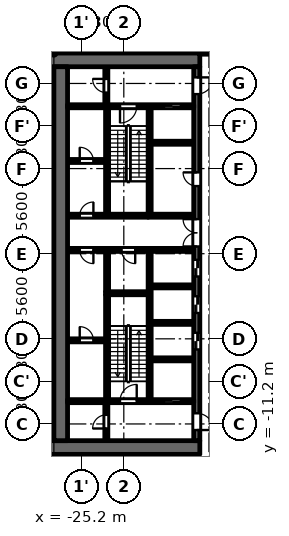
"""IFC4 building model, lengths in metres.
Left out: names, types, materials, properties, quantities, classifications, styles, units other than length and angle.
Written with IfcOpenShell. Run it as: python <this file> out.ifc"""

import sys

from ifc_helpers import new_model, si_unit, direction, frame, frame_2d, origin, place, context, subcontext, project, spatial, rectangle, extrude, element, fill, save


model = new_model("IFC4")
c1 = context("Model", 3, precision=1e-05, world=origin(), true_north=direction((0.0, 1.0)))
c2 = subcontext(c1, "Body", "Model", "MODEL_VIEW")
j1 = project(units=[si_unit("LENGTHUNIT", "METRE"), si_unit("PLANEANGLEUNIT", "RADIAN")], contexts=[c1])
p1 = place(None, origin())
s1 = spatial("IfcSite", under=j1, at=p1, CompositionType="ELEMENT")
p2 = place(p1, origin())
s2 = spatial("IfcBuilding", under=s1, at=p2, CompositionType="ELEMENT")
p3 = place(p2, frame((0.0, 0.0, 6.5)))
s3 = spatial("IfcBuildingStorey", under=s2, at=p3, CompositionType="ELEMENT", Elevation=6.5)
p4 = place(p3, frame((-23.5, -2.5, 0.0), z_axis=(0.0, 0.0, 1.0), x_axis=(0.0, 1.0, 0.0)))
e1 = element("IfcWall", 1, at=p4, inside=s3, PredefinedType="PARTITIONING", context=c2, shape_type="SweptSolid", body=[
    extrude(rectangle(XDim=2.65, YDim=0.2, at=frame_2d((1.325, 0.0))), origin(), (0.0, 0.0, 1.0), 4.45),
])
p5 = place(p3, frame((-20.7, 2.6, 0.0), z_axis=(0.0, 0.0, 1.0), x_axis=(0.0, 1.0, 0.0)))
e2 = element("IfcWall", 2, at=p5, inside=s3, PredefinedType="SHEAR", context=c2, shape_type="SweptSolid", body=[
    extrude(rectangle(XDim=7.0, YDim=0.2, at=frame_2d((3.5, 0.0))), origin(), (0.0, 0.0, 1.0), 4.45),
])
p6 = place(p3, frame((-20.7, -9.6, 0.0), z_axis=(0.0, 0.0, 1.0), x_axis=(0.0, 1.0, 0.0)))
e3 = element("IfcWall", 3, at=p6, inside=s3, PredefinedType="SHEAR", context=c2, shape_type="SweptSolid", body=[
    extrude(rectangle(XDim=9.75, YDim=0.2, at=frame_2d((4.875, 0.0))), origin(), (0.0, 0.0, 1.0), 4.45),
])
p7 = place(p3, frame((-20.8, 2.5, 0.0), z_axis=(0.0, 0.0, 1.0), x_axis=(-1.0, 0.0, 0.0)))
e4 = element("IfcWall", 4, at=p7, inside=s3, PredefinedType="SHEAR", context=c2, shape_type="SweptSolid", body=[
    extrude(rectangle(XDim=5.3, YDim=0.2, at=frame_2d((2.65, 0.0))), origin(), (0.0, 0.0, 1.0), 4.45),
])
p8 = place(p7, frame((3.6, 0.0, 0.0)))
e5 = element("IfcOpeningElement", 5, at=p8, cuts=e4, PredefinedType="OPENING", context=c2, shape_type="SweptSolid", body=[
    extrude(rectangle(XDim=0.9, YDim=2.1, at=frame_2d((0.45, 1.05))), frame((0.0, 0.11, 0.0), z_axis=(0.0, -1.0, 0.0), x_axis=(1.0, 0.0, 0.0)), (0.0, 0.0, 1.0), 0.22),
])
p9 = place(p3, frame((-20.8, 0.25, 0.0), z_axis=(0.0, 0.0, 1.0), x_axis=(-1.0, 0.0, 0.0)))
e6 = element("IfcWall", 6, at=p9, inside=s3, PredefinedType="PARTITIONING", context=c2, shape_type="SweptSolid", body=[
    extrude(rectangle(XDim=5.3, YDim=0.2, at=frame_2d((2.65, 0.0))), origin(), (0.0, 0.0, 1.0), 4.45),
])
p10 = place(p9, frame((0.85, 0.0, 0.0)))
e7 = element("IfcOpeningElement", 7, at=p10, cuts=e6, PredefinedType="OPENING", context=c2, shape_type="SweptSolid", body=[
    extrude(rectangle(XDim=0.9, YDim=2.1, at=frame_2d((0.45, 1.05))), frame((0.0, 0.11, 0.0), z_axis=(0.0, -1.0, 0.0), x_axis=(1.0, 0.0, 0.0)), (0.0, 0.0, 1.0), 0.22),
])
p11 = place(p9, frame((3.6, 0.0, 0.0)))
e8 = element("IfcOpeningElement", 8, at=p11, cuts=e6, PredefinedType="OPENING", context=c2, shape_type="SweptSolid", body=[
    extrude(rectangle(XDim=0.9, YDim=2.1, at=frame_2d((0.45, 1.05))), frame((0.0, 0.11, 0.0), z_axis=(0.0, -1.0, 0.0), x_axis=(1.0, 0.0, 0.0)), (0.0, 0.0, 1.0), 0.22),
])
for number, where, z_axis, x_axis in (
    (9, (-17.4, 12.75, 0.0), (0.0, 0.0, 1.0), (-1.0, 0.0, 0.0)),
    (10, (-17.4, -12.75, 0.0), (0.0, 0.0, 1.0), (-1.0, 0.0, 0.0)),
):
    element("IfcWall", number, at=place(p3, frame(where, z_axis=z_axis, x_axis=x_axis)), inside=s3, PredefinedType="SHEAR", context=c2, shape_type="SweptSolid", body=[
        extrude(rectangle(XDim=10.4, YDim=0.9, at=frame_2d((5.2, 0.0))), origin(), (0.0, 0.0, 1.0), 4.45),
    ])
p12 = place(p3, frame((-17.6, -12.3, 0.0), z_axis=(0.0, 0.0, 1.0), x_axis=(0.0, 1.0, 0.0)))
e11 = element("IfcWall", 11, at=p12, inside=s3, PredefinedType="SHEAR", context=c2, shape_type="SweptSolid", body=[
    extrude(rectangle(XDim=24.6, YDim=0.4, at=frame_2d((12.3, 0.0))), origin(), (0.0, 0.0, 1.0), 4.45),
])
p13 = place(p12, frame((6.0, 0.0, 0.0)))
e12 = element("IfcOpeningElement", 12, at=p13, cuts=e11, PredefinedType="OPENING", context=c2, shape_type="SweptSolid", body=[
    extrude(rectangle(XDim=1.1, YDim=2.1, at=frame_2d((0.55, 1.05))), frame((0.0, 0.21, 0.0), z_axis=(0.0, -1.0, 0.0), x_axis=(1.0, 0.0, 0.0)), (0.0, 0.0, 1.0), 0.42),
])
p14 = place(p12, frame((8.4, 0.0, 0.0)))
e13 = element("IfcOpeningElement", 13, at=p14, cuts=e11, PredefinedType="OPENING", context=c2, shape_type="SweptSolid", body=[
    extrude(rectangle(XDim=1.1, YDim=2.1, at=frame_2d((0.55, 1.05))), frame((0.0, 0.21, 0.0), z_axis=(0.0, -1.0, 0.0), x_axis=(1.0, 0.0, 0.0)), (0.0, 0.0, 1.0), 0.42),
])
p15 = place(p12, frame((10.8, 0.0, 0.0)))
e14 = element("IfcOpeningElement", 14, at=p15, cuts=e11, PredefinedType="OPENING", context=c2, shape_type="SweptSolid", body=[
    extrude(rectangle(XDim=1.1, YDim=2.1, at=frame_2d((0.55, 1.05))), frame((0.0, 0.21, 0.0), z_axis=(0.0, -1.0, 0.0), x_axis=(1.0, 0.0, 0.0)), (0.0, 0.0, 1.0), 0.42),
])
p16 = place(p12, frame((16.75, 0.0, 0.0)))
e15 = element("IfcOpeningElement", 15, at=p16, cuts=e11, PredefinedType="OPENING", context=c2, shape_type="SweptSolid", body=[
    extrude(rectangle(XDim=0.9, YDim=2.1, at=frame_2d((0.45, 1.05))), frame((0.0, 0.21, 0.0), z_axis=(0.0, -1.0, 0.0), x_axis=(1.0, 0.0, 0.0)), (0.0, 0.0, 1.0), 0.42),
])
p17 = place(p12, frame((22.8, 0.0, 0.0)))
e16 = element("IfcOpeningElement", 16, at=p17, cuts=e11, PredefinedType="OPENING", context=c2, shape_type="SweptSolid", body=[
    extrude(rectangle(XDim=1.1, YDim=2.1, at=frame_2d((0.55, 1.05))), frame((0.0, 0.21, 0.0), z_axis=(0.0, -1.0, 0.0), x_axis=(1.0, 0.0, 0.0)), (0.0, 0.0, 1.0), 0.42),
])
p18 = place(p12, frame((0.7, 0.0, 0.0)))
e17 = element("IfcOpeningElement", 17, at=p18, cuts=e11, PredefinedType="OPENING", context=c2, shape_type="SweptSolid", body=[
    extrude(rectangle(XDim=1.1, YDim=2.1, at=frame_2d((0.55, 1.05))), frame((0.0, 0.21, 0.0), z_axis=(0.0, -1.0, 0.0), x_axis=(1.0, 0.0, 0.0)), (0.0, 0.0, 1.0), 0.42),
])
p19 = place(p12, frame((12.775, 0.0, 0.0)))
e18 = element("IfcOpeningElement", 18, at=p19, cuts=e11, PredefinedType="OPENING", context=c2, shape_type="SweptSolid", body=[
    extrude(rectangle(XDim=1.8, YDim=2.1, at=frame_2d((0.9, 1.05))), frame((0.0, 0.21, 0.0), z_axis=(0.0, -1.0, 0.0), x_axis=(1.0, 0.0, 0.0)), (0.0, 0.0, 1.0), 0.42),
])
p20 = place(p3, frame((-26.55, -12.3, 0.0), z_axis=(0.0, 0.0, 1.0), x_axis=(0.0, 1.0, 0.0)))
e19 = element("IfcWall", 19, at=p20, inside=s3, PredefinedType="SHEAR", context=c2, shape_type="SweptSolid", body=[
    extrude(rectangle(XDim=24.6, YDim=0.9, at=frame_2d((12.3, 0.0))), origin(), (0.0, 0.0, 1.0), 4.45),
])
p21 = place(p3, frame((-23.55, 9.8, 0.0), z_axis=(0.0, 0.0, 1.0), x_axis=(0.0, 1.0, 0.0)))
e20 = element("IfcWall", 20, at=p21, inside=s3, PredefinedType="PARTITIONING", context=c2, shape_type="SweptSolid", body=[
    extrude(rectangle(XDim=2.5, YDim=0.2, at=frame_2d((1.25, 0.0))), origin(), (0.0, 0.0, 1.0), 4.45),
])
p22 = place(p21, frame((0.8, 0.0, 0.0)))
e21 = element("IfcOpeningElement", 21, at=p22, cuts=e20, PredefinedType="OPENING", context=c2, shape_type="SweptSolid", body=[
    extrude(rectangle(XDim=0.9, YDim=2.1, at=frame_2d((0.45, 1.05))), frame((0.0, 0.11, 0.0), z_axis=(0.0, -1.0, 0.0), x_axis=(1.0, 0.0, 0.0)), (0.0, 0.0, 1.0), 0.22),
])
p23 = place(p3, frame((-23.55, -12.3, 0.0), z_axis=(0.0, 0.0, 1.0), x_axis=(0.0, 1.0, 0.0)))
e22 = element("IfcWall", 22, at=p23, inside=s3, PredefinedType="PARTITIONING", context=c2, shape_type="SweptSolid", body=[
    extrude(rectangle(XDim=2.5, YDim=0.2, at=frame_2d((1.25, 0.0))), origin(), (0.0, 0.0, 1.0), 4.45),
])
p24 = place(p23, frame((0.8, 0.0, 0.0)))
e23 = element("IfcOpeningElement", 23, at=p24, cuts=e22, PredefinedType="OPENING", context=c2, shape_type="SweptSolid", body=[
    extrude(rectangle(XDim=0.9, YDim=2.1, at=frame_2d((0.45, 1.05))), frame((0.0, 0.11, 0.0), z_axis=(0.0, -1.0, 0.0), x_axis=(1.0, 0.0, 0.0)), (0.0, 0.0, 1.0), 0.22),
])
p25 = place(p3, frame((-23.6, -5.7, 0.0), z_axis=(0.0, 0.0, 1.0), x_axis=(-1.0, 0.0, 0.0)))
e24 = element("IfcWall", 24, at=p25, inside=s3, PredefinedType="PARTITIONING", context=c2, shape_type="SweptSolid", body=[
    extrude(rectangle(XDim=2.5, YDim=0.2, at=frame_2d((1.25, 0.0))), origin(), (0.0, 0.0, 1.0), 4.45),
])
p26 = place(p25, frame((0.8, 0.0, 0.0)))
e25 = element("IfcOpeningElement", 25, at=p26, cuts=e24, PredefinedType="OPENING", context=c2, shape_type="SweptSolid", body=[
    extrude(rectangle(XDim=0.9, YDim=2.1, at=frame_2d((0.45, 1.05))), frame((0.0, 0.11, 0.0), z_axis=(0.0, -1.0, 0.0), x_axis=(1.0, 0.0, 0.0)), (0.0, 0.0, 1.0), 0.22),
])
p27 = place(p3, frame((-23.6, 6.1, 0.0), z_axis=(0.0, 0.0, 1.0), x_axis=(-1.0, 0.0, 0.0)))
e26 = element("IfcWall", 26, at=p27, inside=s3, PredefinedType="PARTITIONING", context=c2, shape_type="SweptSolid", body=[
    extrude(rectangle(XDim=2.5, YDim=0.2, at=frame_2d((1.25, 0.0))), origin(), (0.0, 0.0, 1.0), 4.45),
])
p28 = place(p27, frame((0.8, 0.0, 0.0)))
e27 = element("IfcOpeningElement", 27, at=p28, cuts=e26, PredefinedType="OPENING", context=c2, shape_type="SweptSolid", body=[
    extrude(rectangle(XDim=0.9, YDim=2.1, at=frame_2d((0.45, 1.05))), frame((0.0, 0.11, 0.0), z_axis=(0.0, -1.0, 0.0), x_axis=(1.0, 0.0, 0.0)), (0.0, 0.0, 1.0), 0.22),
])
p29 = place(p3, frame((-17.8, -9.7, 0.0), z_axis=(0.0, 0.0, 1.0), x_axis=(-1.0, 0.0, 0.0)))
e28 = element("IfcWall", 28, at=p29, inside=s3, PredefinedType="SHEAR", context=c2, shape_type="SweptSolid", body=[
    extrude(rectangle(XDim=8.3, YDim=0.2, at=frame_2d((4.15, 0.0))), origin(), (0.0, 0.0, 1.0), 4.45),
])
p30 = place(p29, frame((0.85, 0.0, 0.0)))
e29 = element("IfcOpeningElement", 29, at=p30, cuts=e28, PredefinedType="OPENING", context=c2, shape_type="SweptSolid", body=[
    extrude(rectangle(XDim=1.1, YDim=2.1, at=frame_2d((0.55, 1.05))), frame((0.0, 0.11, 0.0), z_axis=(0.0, -1.0, 0.0), x_axis=(1.0, 0.0, 0.0)), (0.0, 0.0, 1.0), 0.22),
])
p31 = place(p29, frame((3.75, 0.0, 0.0)))
e30 = element("IfcOpeningElement", 30, at=p31, cuts=e28, PredefinedType="OPENING", context=c2, shape_type="SweptSolid", body=[
    extrude(rectangle(XDim=1.1, YDim=2.1, at=frame_2d((0.55, 1.05))), frame((0.0, 0.11, 0.0), z_axis=(0.0, -1.0, 0.0), x_axis=(1.0, 0.0, 0.0)), (0.0, 0.0, 1.0), 0.22),
])
for number, where, z_axis, x_axis in (
    (31, (-17.8, -6.95, 0.0), (0.0, 0.0, 1.0), (-1.0, 0.0, 0.0)),
    (32, (-17.8, -4.55, 0.0), (0.0, 0.0, 1.0), (-1.0, 0.0, 0.0)),
    (33, (-17.8, -2.15, 0.0), (0.0, 0.0, 1.0), (-1.0, 0.0, 0.0)),
):
    element("IfcWall", number, at=place(p3, frame(where, z_axis=z_axis, x_axis=x_axis)), inside=s3, PredefinedType="PARTITIONING", context=c2, shape_type="SweptSolid", body=[
        extrude(rectangle(XDim=2.8, YDim=0.2, at=frame_2d((1.4, 0.0))), origin(), (0.0, 0.0, 1.0), 4.45),
    ])
for number, where, z_axis, x_axis in (
    (34, (-17.8, 0.25, 0.0), (0.0, 0.0, 1.0), (-1.0, 0.0, 0.0)),
    (35, (-17.8, 2.5, 0.0), (0.0, 0.0, 1.0), (-1.0, 0.0, 0.0)),
):
    element("IfcWall", number, at=place(p3, frame(where, z_axis=z_axis, x_axis=x_axis)), inside=s3, PredefinedType="PARTITIONING", context=c2, shape_type="SweptSolid", body=[
        extrude(rectangle(XDim=3.0, YDim=0.2, at=frame_2d((1.5, 0.0))), origin(), (0.0, 0.0, 1.0), 4.45),
    ])
p32 = place(p3, frame((-17.8, 7.3, 0.0), z_axis=(0.0, 0.0, 1.0), x_axis=(-1.0, 0.0, 0.0)))
e36 = element("IfcWall", 36, at=p32, inside=s3, PredefinedType="PARTITIONING", context=c2, shape_type="SweptSolid", body=[
    extrude(rectangle(XDim=2.8, YDim=0.2, at=frame_2d((1.4, 0.0))), origin(), (0.0, 0.0, 1.0), 4.45),
])
p33 = place(p3, frame((-17.8, 9.7, 0.0), z_axis=(0.0, 0.0, 1.0), x_axis=(-1.0, 0.0, 0.0)))
e37 = element("IfcWall", 37, at=p33, inside=s3, PredefinedType="SHEAR", context=c2, shape_type="SweptSolid", body=[
    extrude(rectangle(XDim=8.3, YDim=0.2, at=frame_2d((4.15, 0.0))), origin(), (0.0, 0.0, 1.0), 4.45),
])
p34 = place(p33, frame((0.85, 0.0, 0.0)))
e38 = element("IfcOpeningElement", 38, at=p34, cuts=e37, PredefinedType="OPENING", context=c2, shape_type="SweptSolid", body=[
    extrude(rectangle(XDim=1.1, YDim=2.1, at=frame_2d((0.55, 1.05))), frame((0.0, 0.11, 0.0), z_axis=(0.0, -1.0, 0.0), x_axis=(1.0, 0.0, 0.0)), (0.0, 0.0, 1.0), 0.22),
])
p35 = place(p33, frame((3.75, 0.0, 0.0)))
e39 = element("IfcOpeningElement", 39, at=p35, cuts=e37, PredefinedType="OPENING", context=c2, shape_type="SweptSolid", body=[
    extrude(rectangle(XDim=1.1, YDim=2.1, at=frame_2d((0.55, 1.05))), frame((0.0, 0.11, 0.0), z_axis=(0.0, -1.0, 0.0), x_axis=(1.0, 0.0, 0.0)), (0.0, 0.0, 1.0), 0.22),
])
p36 = place(p3, frame((-23.5, 2.6, 0.0), z_axis=(0.0, 0.0, 1.0), x_axis=(0.0, 1.0, 0.0)))
e40 = element("IfcWall", 40, at=p36, inside=s3, PredefinedType="SHEAR", context=c2, shape_type="SweptSolid", body=[
    extrude(rectangle(XDim=7.0, YDim=0.2, at=frame_2d((3.5, 0.0))), origin(), (0.0, 0.0, 1.0), 4.45),
])
p37 = place(p3, frame((-23.5, -9.6, 0.0), z_axis=(0.0, 0.0, 1.0), x_axis=(0.0, 1.0, 0.0)))
e41 = element("IfcWall", 41, at=p37, inside=s3, PredefinedType="SHEAR", context=c2, shape_type="SweptSolid", body=[
    extrude(rectangle(XDim=6.9, YDim=0.2, at=frame_2d((3.45, 0.0))), origin(), (0.0, 0.0, 1.0), 4.45),
])
p38 = place(p3, frame((-20.8, -2.6, 0.0), z_axis=(0.0, 0.0, 1.0), x_axis=(-1.0, 0.0, 0.0)))
e42 = element("IfcWall", 42, at=p38, inside=s3, PredefinedType="SHEAR", context=c2, shape_type="SweptSolid", body=[
    extrude(rectangle(XDim=2.8, YDim=0.2, at=frame_2d((1.4, 0.0))), origin(), (0.0, 0.0, 1.0), 4.45),
])
p39 = place(p3, frame((-17.4, 13.2, 0.0), z_axis=(0.0, 0.0, 1.0), x_axis=(1.0, 0.0, 0.0)))
e43 = element("IfcWall", 43, at=p39, inside=s3, PredefinedType="PARTITIONING", context=c2, shape_type="SweptSolid", body=[
    extrude(rectangle(XDim=34.8, YDim=0.15, at=frame_2d((17.4, 0.0))), origin(), (0.0, 0.0, 1.0), 4.45),
])
p40 = place(p39, frame((3.05, 0.0, 0.0)))
e44 = element("IfcOpeningElement", 44, at=p40, cuts=e43, PredefinedType="OPENING", context=c2, shape_type="SweptSolid", body=[
    extrude(rectangle(XDim=1.8, YDim=2.1, at=frame_2d((0.9, 1.05))), frame((0.0, 0.085, 0.0), z_axis=(0.0, -1.0, 0.0), x_axis=(1.0, 0.0, 0.0)), (0.0, 0.0, 1.0), 0.17),
])
p41 = place(p39, frame((0.75, 0.0, 0.0)))
e45 = element("IfcOpeningElement", 45, at=p41, cuts=e43, PredefinedType="OPENING", context=c2, shape_type="SweptSolid", body=[
    extrude(rectangle(XDim=1.0, YDim=2.1, at=frame_2d((0.5, 1.05))), frame((0.0, 0.085, 0.0), z_axis=(0.0, -1.0, 0.0), x_axis=(1.0, 0.0, 0.0)), (0.0, 0.0, 1.0), 0.17),
])
p42 = place(p39, frame((33.15, 0.0, 0.0)))
e46 = element("IfcOpeningElement", 46, at=p42, cuts=e43, PredefinedType="OPENING", context=c2, shape_type="SweptSolid", body=[
    extrude(rectangle(XDim=1.0, YDim=2.1, at=frame_2d((0.5, 1.05))), frame((0.0, 0.085, 0.0), z_axis=(0.0, -1.0, 0.0), x_axis=(1.0, 0.0, 0.0)), (0.0, 0.0, 1.0), 0.17),
])
p43 = place(p30, origin())
e47 = element("IfcDoor", 47, at=p43, inside=s3, OperationType="DOUBLE_DOOR_SLIDING", PredefinedType="DOOR", context=c2, shape_type="SweptSolid", body=[
    extrude(rectangle(XDim=1.1, YDim=2.1, at=frame_2d((0.55, 1.05))), frame((0.0, 0.025, 0.0), z_axis=(0.0, -1.0, 0.0), x_axis=(1.0, 0.0, 0.0)), (0.0, 0.0, 1.0), 0.05),
])
fill(e29, e47)
p44 = place(p13, origin())
e48 = element("IfcDoor", 48, at=p44, inside=s3, OperationType="DOUBLE_DOOR_SLIDING", PredefinedType="DOOR", context=c2, shape_type="SweptSolid", body=[
    extrude(rectangle(XDim=1.1, YDim=2.1, at=frame_2d((0.55, 1.05))), frame((0.0, 0.025, 0.0), z_axis=(0.0, -1.0, 0.0), x_axis=(1.0, 0.0, 0.0)), (0.0, 0.0, 1.0), 0.05),
])
fill(e12, e48)
p45 = place(p14, origin())
e49 = element("IfcDoor", 49, at=p45, inside=s3, OperationType="DOUBLE_DOOR_SLIDING", PredefinedType="DOOR", context=c2, shape_type="SweptSolid", body=[
    extrude(rectangle(XDim=1.1, YDim=2.1, at=frame_2d((0.55, 1.05))), frame((0.0, 0.025, 0.0), z_axis=(0.0, -1.0, 0.0), x_axis=(1.0, 0.0, 0.0)), (0.0, 0.0, 1.0), 0.05),
])
fill(e13, e49)
p46 = place(p15, origin())
e50 = element("IfcDoor", 50, at=p46, inside=s3, OperationType="DOUBLE_DOOR_SLIDING", PredefinedType="DOOR", context=c2, shape_type="SweptSolid", body=[
    extrude(rectangle(XDim=1.1, YDim=2.1, at=frame_2d((0.55, 1.05))), frame((0.0, 0.025, 0.0), z_axis=(0.0, -1.0, 0.0), x_axis=(1.0, 0.0, 0.0)), (0.0, 0.0, 1.0), 0.05),
])
fill(e14, e50)
p47 = place(p16, origin())
e51 = element("IfcDoor", 51, at=p47, inside=s3, OperationType="SINGLE_SWING_LEFT", PredefinedType="DOOR", context=c2, shape_type="SweptSolid", body=[
    extrude(rectangle(XDim=0.9, YDim=2.1, at=frame_2d((0.45, 1.05))), frame((0.0, 0.025, 0.0), z_axis=(0.0, -1.0, 0.0), x_axis=(1.0, 0.0, 0.0)), (0.0, 0.0, 1.0), 0.05),
])
fill(e15, e51)
p48 = place(p34, origin())
e52 = element("IfcDoor", 52, at=p48, inside=s3, OperationType="DOUBLE_DOOR_SLIDING", PredefinedType="DOOR", context=c2, shape_type="SweptSolid", body=[
    extrude(rectangle(XDim=1.1, YDim=2.1, at=frame_2d((0.55, 1.05))), frame((0.0, 0.025, 0.0), z_axis=(0.0, -1.0, 0.0), x_axis=(1.0, 0.0, 0.0)), (0.0, 0.0, 1.0), 0.05),
])
fill(e38, e52)
p49 = place(p17, origin())
e53 = element("IfcDoor", 53, at=p49, inside=s3, OperationType="SINGLE_SWING_RIGHT", PredefinedType="DOOR", context=c2, shape_type="SweptSolid", body=[
    extrude(rectangle(XDim=1.1, YDim=2.1, at=frame_2d((0.55, 1.05))), frame((0.0, 0.025, 0.0), z_axis=(0.0, -1.0, 0.0), x_axis=(1.0, 0.0, 0.0)), (0.0, 0.0, 1.0), 0.05),
])
fill(e16, e53)
p50 = place(p18, origin())
e54 = element("IfcDoor", 54, at=p50, inside=s3, OperationType="SINGLE_SWING_LEFT", PredefinedType="DOOR", context=c2, shape_type="SweptSolid", body=[
    extrude(rectangle(XDim=1.1, YDim=2.1, at=frame_2d((0.55, 1.05))), frame((0.0, 0.025, 0.0), z_axis=(0.0, -1.0, 0.0), x_axis=(1.0, 0.0, 0.0)), (0.0, 0.0, 1.0), 0.05),
])
fill(e17, e54)
p51 = place(p22, origin())
e55 = element("IfcDoor", 55, at=p51, inside=s3, OperationType="SINGLE_SWING_LEFT", PredefinedType="DOOR", context=c2, shape_type="SweptSolid", body=[
    extrude(rectangle(XDim=0.9, YDim=2.1, at=frame_2d((0.45, 1.05))), frame((0.0, 0.025, 0.0), z_axis=(0.0, -1.0, 0.0), x_axis=(1.0, 0.0, 0.0)), (0.0, 0.0, 1.0), 0.05),
])
fill(e21, e55)
p52 = place(p24, origin())
e56 = element("IfcDoor", 56, at=p52, inside=s3, OperationType="SINGLE_SWING_RIGHT", PredefinedType="DOOR", context=c2, shape_type="SweptSolid", body=[
    extrude(rectangle(XDim=0.9, YDim=2.1, at=frame_2d((0.45, 1.05))), frame((0.0, 0.025, 0.0), z_axis=(0.0, -1.0, 0.0), x_axis=(1.0, 0.0, 0.0)), (0.0, 0.0, 1.0), 0.05),
])
fill(e23, e56)
p53 = place(p35, origin())
e57 = element("IfcDoor", 57, at=p53, inside=s3, OperationType="SINGLE_SWING_LEFT", PredefinedType="DOOR", context=c2, shape_type="SweptSolid", body=[
    extrude(rectangle(XDim=1.1, YDim=2.1, at=frame_2d((0.55, 1.05))), frame((0.0, 0.025, 0.0), z_axis=(0.0, -1.0, 0.0), x_axis=(1.0, 0.0, 0.0)), (0.0, 0.0, 1.0), 0.05),
])
fill(e39, e57)
p54 = place(p31, origin())
e58 = element("IfcDoor", 58, at=p54, inside=s3, OperationType="SINGLE_SWING_LEFT", PredefinedType="DOOR", context=c2, shape_type="SweptSolid", body=[
    extrude(rectangle(XDim=1.1, YDim=2.1, at=frame_2d((0.55, 1.05))), frame((0.0, 0.025, 0.0), z_axis=(0.0, -1.0, 0.0), x_axis=(1.0, 0.0, 0.0)), (0.0, 0.0, 1.0), 0.05),
])
fill(e30, e58)
p55 = place(p19, origin())
e59 = element("IfcDoor", 59, at=p55, inside=s3, OperationType="DOUBLE_DOOR_SINGLE_SWING", PredefinedType="DOOR", context=c2, shape_type="SweptSolid", body=[
    extrude(rectangle(XDim=1.8, YDim=2.1, at=frame_2d((0.9, 1.05))), frame((0.0, 0.025, 0.0), z_axis=(0.0, -1.0, 0.0), x_axis=(1.0, 0.0, 0.0)), (0.0, 0.0, 1.0), 0.05),
])
fill(e18, e59)
p56 = place(p10, origin())
e60 = element("IfcDoor", 60, at=p56, inside=s3, OperationType="SINGLE_SWING_RIGHT", PredefinedType="DOOR", context=c2, shape_type="SweptSolid", body=[
    extrude(rectangle(XDim=0.9, YDim=2.1, at=frame_2d((0.45, 1.05))), frame((0.0, 0.025, 0.0), z_axis=(0.0, -1.0, 0.0), x_axis=(1.0, 0.0, 0.0)), (0.0, 0.0, 1.0), 0.05),
])
fill(e7, e60)
p57 = place(p26, origin())
e61 = element("IfcDoor", 61, at=p57, inside=s3, OperationType="SINGLE_SWING_RIGHT", PredefinedType="DOOR", context=c2, shape_type="SweptSolid", body=[
    extrude(rectangle(XDim=0.9, YDim=2.1, at=frame_2d((0.45, 1.05))), frame((0.0, 0.025, 0.0), z_axis=(0.0, -1.0, 0.0), x_axis=(1.0, 0.0, 0.0)), (0.0, 0.0, 1.0), 0.05),
])
fill(e25, e61)
p58 = place(p11, origin())
e62 = element("IfcDoor", 62, at=p58, inside=s3, OperationType="SINGLE_SWING_RIGHT", PredefinedType="DOOR", context=c2, shape_type="SweptSolid", body=[
    extrude(rectangle(XDim=0.9, YDim=2.1, at=frame_2d((0.45, 1.05))), frame((0.0, 0.025, 0.0), z_axis=(0.0, -1.0, 0.0), x_axis=(1.0, 0.0, 0.0)), (0.0, 0.0, 1.0), 0.05),
])
fill(e8, e62)
p59 = place(p28, origin())
e63 = element("IfcDoor", 63, at=p59, inside=s3, OperationType="SINGLE_SWING_RIGHT", PredefinedType="DOOR", context=c2, shape_type="SweptSolid", body=[
    extrude(rectangle(XDim=0.9, YDim=2.1, at=frame_2d((0.45, 1.05))), frame((0.0, 0.025, 0.0), z_axis=(0.0, -1.0, 0.0), x_axis=(1.0, 0.0, 0.0)), (0.0, 0.0, 1.0), 0.05),
])
fill(e27, e63)
p60 = place(p8, origin())
e64 = element("IfcDoor", 64, at=p60, inside=s3, OperationType="SINGLE_SWING_LEFT", PredefinedType="DOOR", context=c2, shape_type="SweptSolid", body=[
    extrude(rectangle(XDim=0.9, YDim=2.1, at=frame_2d((0.45, 1.05))), frame((0.0, 0.025, 0.0), z_axis=(0.0, -1.0, 0.0), x_axis=(1.0, 0.0, 0.0)), (0.0, 0.0, 1.0), 0.05),
])
fill(e5, e64)
save(model, sys.argv[1])
